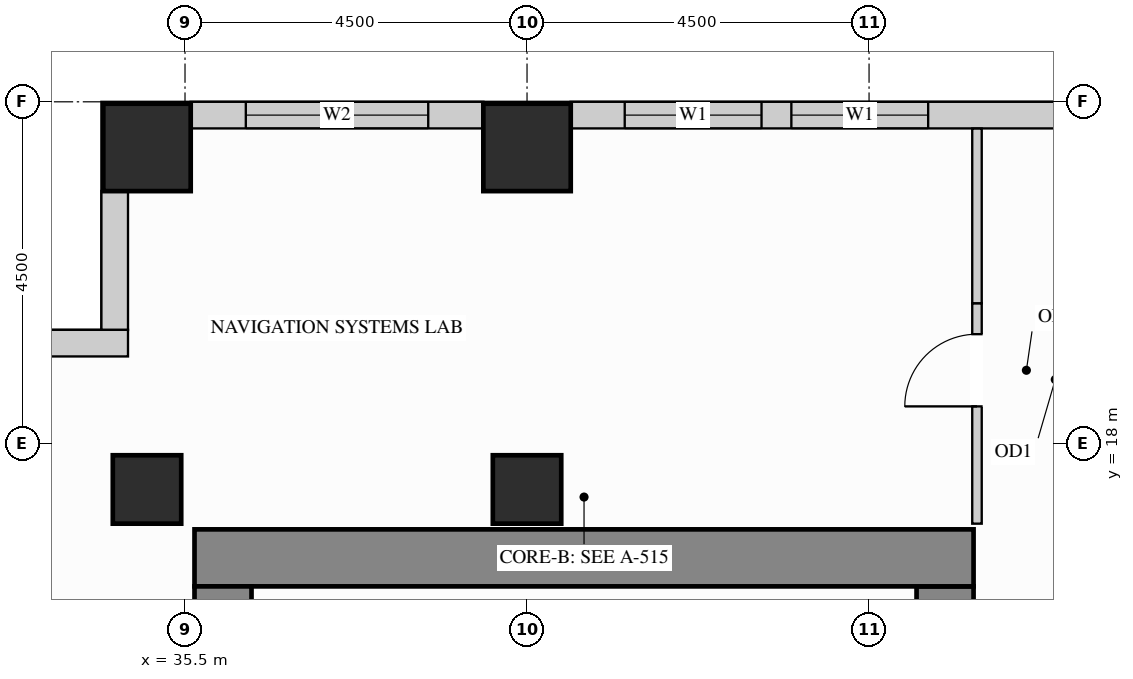
"""IFC4 building model, lengths in metres.
Left out: names, types, materials, properties, quantities, classifications, styles, units other than length and angle.
Written with IfcOpenShell. Run it as: python <this file> out.ifc"""

import sys

from ifc_helpers import new_model, si_unit, direction, frame, frame_2d, origin, origin_2d, place, context, subcontext, project, spatial, rectangle, extrude, source, transform, mapped, element, fill, save


model = new_model("IFC4")
c1 = context("Model", 3, precision=1e-05, world=origin(), true_north=direction((0.0, 1.0)))
c2 = subcontext(c1, "Body", "Model", "MODEL_VIEW")
j1 = project(units=[si_unit("LENGTHUNIT", "METRE"), si_unit("PLANEANGLEUNIT", "RADIAN")], contexts=[c1])
p1 = place(None, origin())
s1 = spatial("IfcSite", under=j1, at=p1, CompositionType="ELEMENT")
p2 = place(p1, origin())
s2 = spatial("IfcBuilding", under=s1, at=p2, CompositionType="ELEMENT")
p3 = place(p2, frame((0.0, 0.0, 102.6)))
s3 = spatial("IfcBuildingStorey", under=s2, at=p3, CompositionType="ELEMENT", Elevation=102.6)
m1 = source(origin(), c2, "Body", "SweptSolid", [
    extrude(rectangle(XDim=0.9, YDim=0.9, at=origin_2d()), origin(), (0.0, 0.0, 1.0), 3.38),
])
for number, where, z_axis, x_axis in (
    (1, (35.0, 17.4, 0.0), (0.0, 0.0, 1.0), (1.0, 0.0, 0.0)),
    (2, (40.0, 17.4, 0.0), (0.0, 0.0, 1.0), (1.0, 0.0, 0.0)),
):
    element("IfcColumn", number, at=place(p3, frame(where, z_axis=z_axis, x_axis=x_axis)), inside=s3, PredefinedType="COLUMN", context=c2, shape_type="MappedRepresentation", body=[
        mapped(m1, transform((0.0, 0.0, 0.0), x_axis=(1.0, 0.0, 0.0), y_axis=(0.0, 1.0, 0.0), z_axis=(0.0, 0.0, 1.0))),
    ])
m2 = source(origin(), c2, "Body", "SweptSolid", [
    extrude(rectangle(XDim=1.15, YDim=1.15, at=origin_2d()), origin(), (0.0, 0.0, 1.0), 3.38),
])
for number, where, z_axis, x_axis in (
    (3, (35.0, 21.9, 0.0), (0.0, 0.0, 1.0), (1.0, 0.0, 0.0)),
    (4, (40.0, 21.9, 0.0), (0.0, 0.0, 1.0), (1.0, 0.0, 0.0)),
):
    element("IfcColumn", number, at=place(p3, frame(where, z_axis=z_axis, x_axis=x_axis)), inside=s3, PredefinedType="COLUMN", context=c2, shape_type="MappedRepresentation", body=[
        mapped(m2, transform((0.0, 0.0, 0.0), x_axis=(1.0, 0.0, 0.0), y_axis=(0.0, 1.0, 0.0), z_axis=(0.0, 0.0, 1.0))),
    ])
m3 = source(origin(), c2, "Body", "SweptSolid", [
    extrude(rectangle(XDim=3.725, YDim=0.75, at=frame_2d((1.863, 0.0))), origin(), (0.0, 0.0, 1.0), 3.38),
])
p4 = place(p3, frame((45.5, 12.4, 0.0), z_axis=(0.0, 0.0, 1.0), x_axis=(0.0, 1.0, 0.0)))
e5 = element("IfcWall", 5, at=p4, inside=s3, PredefinedType="SHEAR", context=c2, shape_type="MappedRepresentation", body=[
    mapped(m3, transform((0.0, 0.0, 0.0), x_axis=(1.0, 0.0, 0.0), y_axis=(0.0, 1.0, 0.0), z_axis=(0.0, 0.0, 1.0))),
])
m4 = source(origin(), c2, "Body", "SweptSolid", [
    extrude(rectangle(XDim=10.25, YDim=0.75, at=frame_2d((5.125, 0.0))), origin(), (0.0, 0.0, 1.0), 3.38),
])
p5 = place(p3, frame((35.625, 16.5, 0.0), z_axis=(0.0, 0.0, 1.0), x_axis=(1.0, 0.0, 0.0)))
e6 = element("IfcWall", 6, at=p5, inside=s3, PredefinedType="SHEAR", context=c2, shape_type="MappedRepresentation", body=[
    mapped(m4, transform((0.0, 0.0, 0.0), x_axis=(1.0, 0.0, 0.0), y_axis=(0.0, 1.0, 0.0), z_axis=(0.0, 0.0, 1.0))),
])
p6 = place(p3, frame((36.0, 12.4, 0.0), z_axis=(0.0, 0.0, 1.0), x_axis=(0.0, 1.0, 0.0)))
e7 = element("IfcWall", 7, at=p6, inside=s3, PredefinedType="SHEAR", context=c2, shape_type="MappedRepresentation", body=[
    mapped(m3, transform((0.0, 0.0, 0.0), x_axis=(1.0, 0.0, 0.0), y_axis=(0.0, 1.0, 0.0), z_axis=(0.0, 0.0, 1.0))),
])
p7 = place(p3, frame((47.027, 22.325, 0.0), z_axis=(0.0, 0.0, 1.0), x_axis=(-1.0, 0.0, 0.0)))
e8 = element("IfcWall", 8, at=p7, inside=s3, PredefinedType="SOLIDWALL", context=c2, shape_type="SweptSolid", body=[
    extrude(rectangle(XDim=6.454, YDim=0.35, at=frame_2d((3.227, 0.0))), origin(), (0.0, 0.0, 1.0), 3.365),
])
p8 = place(p7, frame((1.749, 0.0, 0.78)))
e9 = element("IfcOpeningElement", 9, at=p8, cuts=e8, PredefinedType="OPENING", context=c2, shape_type="SweptSolid", body=[
    extrude(rectangle(XDim=1.8, YDim=2.1, at=frame_2d((0.9, 1.05))), frame((0.0, 0.185, 0.0), z_axis=(0.0, -1.0, 0.0), x_axis=(1.0, 0.0, 0.0)), (0.0, 0.0, 1.0), 0.37),
])
p9 = place(p7, frame((3.942, 0.0, 0.78)))
e10 = element("IfcOpeningElement", 10, at=p9, cuts=e8, PredefinedType="OPENING", context=c2, shape_type="SweptSolid", body=[
    extrude(rectangle(XDim=1.8, YDim=2.1, at=frame_2d((0.9, 1.05))), frame((0.0, 0.185, 0.0), z_axis=(0.0, -1.0, 0.0), x_axis=(1.0, 0.0, 0.0)), (0.0, 0.0, 1.0), 0.37),
])
p10 = place(p3, frame((39.427, 22.325, 0.0), z_axis=(0.0, 0.0, 1.0), x_axis=(-1.0, 0.0, 0.0)))
e11 = element("IfcWall", 11, at=p10, inside=s3, PredefinedType="SOLIDWALL", context=c2, shape_type="SweptSolid", body=[
    extrude(rectangle(XDim=3.854, YDim=0.35, at=frame_2d((1.927, 0.0))), origin(), (0.0, 0.0, 1.0), 3.365),
])
p11 = place(p10, frame((0.727, 0.0, 0.78)))
e12 = element("IfcOpeningElement", 12, at=p11, cuts=e11, PredefinedType="OPENING", context=c2, shape_type="SweptSolid", body=[
    extrude(rectangle(XDim=2.4, YDim=2.1, at=frame_2d((1.2, 1.05))), frame((0.0, 0.185, 0.0), z_axis=(0.0, -1.0, 0.0), x_axis=(1.0, 0.0, 0.0)), (0.0, 0.0, 1.0), 0.37),
])
m5 = source(origin(), c2, "Body", "SweptSolid", [
    extrude(rectangle(XDim=1.829, YDim=0.35, at=frame_2d((0.915, 0.0))), origin(), (0.0, 0.0, 1.0), 3.365),
])
p12 = place(p3, frame((34.575, 21.327, 0.0), z_axis=(0.0, 0.0, 1.0), x_axis=(0.0, -1.0, 0.0)))
e13 = element("IfcWall", 13, at=p12, inside=s3, PredefinedType="SOLIDWALL", context=c2, shape_type="MappedRepresentation", body=[
    mapped(m5, transform((0.0, 0.0, 0.0), x_axis=(1.0, 0.0, 0.0), y_axis=(0.0, 1.0, 0.0), z_axis=(0.0, 0.0, 1.0))),
])
p13 = place(p3, frame((34.75, 19.325, 0.0), z_axis=(0.0, 0.0, 1.0), x_axis=(-1.0, 0.0, 0.0)))
e14 = element("IfcWall", 14, at=p13, inside=s3, PredefinedType="SOLIDWALL", context=c2, shape_type="SweptSolid", body=[
    extrude(rectangle(XDim=15.6, YDim=0.35, at=frame_2d((7.8, 0.0))), origin(), (0.0, 0.0, 1.0), 3.365),
])
p14 = place(p13, frame((4.307, 0.0, 0.78)))
e15 = element("IfcOpeningElement", 15, at=p14, cuts=e14, PredefinedType="OPENING", context=c2, shape_type="SweptSolid", body=[
    extrude(rectangle(XDim=1.5, YDim=2.0, at=frame_2d((0.75, 1.0))), frame((0.0, 0.185, 0.0), z_axis=(0.0, -1.0, 0.0), x_axis=(1.0, 0.0, 0.0)), (0.0, 0.0, 1.0), 0.37),
])
p15 = place(p13, frame((9.793, 0.0, 0.78)))
e16 = element("IfcOpeningElement", 16, at=p15, cuts=e14, PredefinedType="OPENING", context=c2, shape_type="SweptSolid", body=[
    extrude(rectangle(XDim=1.5, YDim=2.0, at=frame_2d((0.75, 1.0))), frame((0.0, 0.185, 0.0), z_axis=(0.0, -1.0, 0.0), x_axis=(1.0, 0.0, 0.0)), (0.0, 0.0, 1.0), 0.37),
])
p16 = place(p3, frame((45.92, 16.95, 0.0), z_axis=(0.0, 0.0, 1.0), x_axis=(0.0, 1.0, 0.0)))
e17 = element("IfcWall", 17, at=p16, inside=s3, PredefinedType="PARTITIONING", context=c2, shape_type="SweptSolid", body=[
    extrude(rectangle(XDim=2.9, YDim=0.125, at=frame_2d((1.45, 0.0))), origin(), (0.0, 0.0, 1.0), 3.365),
])
p17 = place(p16, frame((1.543, 0.0, 0.0)))
e18 = element("IfcOpeningElement", 18, at=p17, cuts=e17, PredefinedType="OPENING", context=c2, shape_type="SweptSolid", body=[
    extrude(rectangle(XDim=0.95, YDim=2.15, at=frame_2d((0.475, 1.075))), frame((0.0, 0.073, 0.0), z_axis=(0.0, -1.0, 0.0), x_axis=(1.0, 0.0, 0.0)), (0.0, 0.0, 1.0), 0.145),
])
m6 = source(origin(), c2, "Body", "SweptSolid", [
    extrude(rectangle(XDim=2.298, YDim=0.125, at=frame_2d((1.149, 0.0))), origin(), (0.0, 0.0, 1.0), 3.365),
])
p18 = place(p3, frame((45.92, 19.85, 0.0), z_axis=(0.0, 0.0, 1.0), x_axis=(0.0, 1.0, 0.0)))
e19 = element("IfcWall", 19, at=p18, inside=s3, PredefinedType="PARTITIONING", context=c2, shape_type="MappedRepresentation", body=[
    mapped(m6, transform((0.0, 0.0, 0.0), x_axis=(1.0, 0.0, 0.0), y_axis=(0.0, 1.0, 0.0), z_axis=(0.0, 0.0, 1.0))),
])
m7 = source(origin(), c2, "Body", "SweptSolid", [
    extrude(rectangle(XDim=0.95, YDim=2.15, at=frame_2d((0.475, 1.075))), frame((0.0, 0.025, 0.0), z_axis=(0.0, -1.0, 0.0), x_axis=(1.0, 0.0, 0.0)), (0.0, 0.0, 1.0), 0.05),
])
p19 = place(p17, origin())
e20 = element("IfcDoor", 20, at=p19, inside=s3, OperationType="SINGLE_SWING_LEFT", PredefinedType="DOOR", context=c2, shape_type="MappedRepresentation", body=[
    mapped(m7, transform((0.0, 0.0, 0.0), x_axis=(1.0, 0.0, 0.0), y_axis=(0.0, 1.0, 0.0), z_axis=(0.0, 0.0, 1.0))),
])
fill(e18, e20)
m8 = source(origin(), c2, "Body", "SweptSolid", [
    extrude(rectangle(XDim=1.8, YDim=2.1, at=frame_2d((0.9, 1.05))), frame((0.0, 0.03, 0.0), z_axis=(0.0, -1.0, 0.0), x_axis=(1.0, 0.0, 0.0)), (0.0, 0.0, 1.0), 0.06),
])
p20 = place(p8, origin())
e21 = element("IfcWindow", 21, at=p20, inside=s3, PartitioningType="SINGLE_PANEL", PredefinedType="WINDOW", context=c2, shape_type="MappedRepresentation", body=[
    mapped(m8, transform((0.0, 0.0, 0.0), x_axis=(1.0, 0.0, 0.0), y_axis=(0.0, 1.0, 0.0), z_axis=(0.0, 0.0, 1.0))),
])
fill(e9, e21)
p21 = place(p9, origin())
e22 = element("IfcWindow", 22, at=p21, inside=s3, PartitioningType="SINGLE_PANEL", PredefinedType="WINDOW", context=c2, shape_type="MappedRepresentation", body=[
    mapped(m8, transform((0.0, 0.0, 0.0), x_axis=(1.0, 0.0, 0.0), y_axis=(0.0, 1.0, 0.0), z_axis=(0.0, 0.0, 1.0))),
])
fill(e10, e22)
m9 = source(origin(), c2, "Body", "SweptSolid", [
    extrude(rectangle(XDim=2.4, YDim=2.1, at=frame_2d((1.2, 1.05))), frame((0.0, 0.03, 0.0), z_axis=(0.0, -1.0, 0.0), x_axis=(1.0, 0.0, 0.0)), (0.0, 0.0, 1.0), 0.06),
])
p22 = place(p11, origin())
e23 = element("IfcWindow", 23, at=p22, inside=s3, PartitioningType="SINGLE_PANEL", PredefinedType="WINDOW", context=c2, shape_type="MappedRepresentation", body=[
    mapped(m9, transform((0.0, 0.0, 0.0), x_axis=(1.0, 0.0, 0.0), y_axis=(0.0, 1.0, 0.0), z_axis=(0.0, 0.0, 1.0))),
])
fill(e12, e23)
save(model, sys.argv[1])
